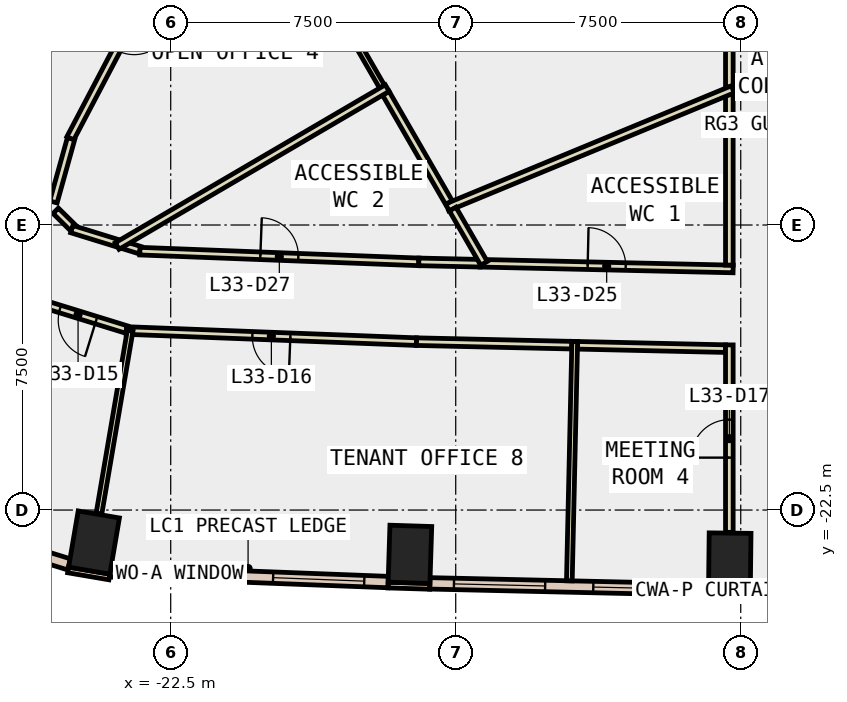
"""IFC4 building model, lengths in metres.
Left out: names, types, materials, properties, quantities, classifications, styles, units other than length and angle.
Written with IfcOpenShell. Run it as: python <this file> out.ifc"""

import sys

from ifc_helpers import new_model, si_unit, direction, frame, frame_2d, origin, origin_2d, place, context, subcontext, project, spatial, rectangle, extrude, element, fill, save


model = new_model("IFC4")
c1 = context("Model", 3, precision=1e-05, world=origin(), true_north=direction((0.0, 1.0)))
c2 = subcontext(c1, "Body", "Model", "MODEL_VIEW")
j1 = project(units=[si_unit("LENGTHUNIT", "METRE"), si_unit("PLANEANGLEUNIT", "RADIAN")], contexts=[c1])
p1 = place(None, origin())
s1 = spatial("IfcSite", under=j1, at=p1, CompositionType="ELEMENT")
p2 = place(p1, origin())
s2 = spatial("IfcBuilding", under=s1, at=p2, CompositionType="ELEMENT")
p3 = place(p2, frame((0.0, 0.0, 150.8)))
s3 = spatial("IfcBuildingStorey", under=s2, at=p3, CompositionType="ELEMENT", Elevation=150.8)
for number, where, z_axis, x_axis in (
    (1, (-24.518, -23.355, -0.4), (0.0, 0.0, 1.0), (-0.986, 0.168, 0.0)),
    (2, (-16.205, -23.666, -0.4), (0.0, 0.0, 1.0), (-0.999, 0.032, 0.0)),
    (3, (-7.789, -23.857, -0.4), (0.0, 0.0, 1.0), (-1.0, 0.012, 0.0)),
):
    element("IfcColumn", number, at=place(p3, frame(where, z_axis=z_axis, x_axis=x_axis)), inside=s3, PredefinedType="COLUMN", context=c2, shape_type="SweptSolid", body=[
        extrude(rectangle(XDim=1.1, YDim=1.5, at=origin_2d()), origin(), (0.0, 0.0, 1.0), 4.2),
    ])
p4 = place(p3, frame((-25.199, -24.076, 0.0), z_axis=(0.0, 0.0, 1.0), x_axis=(0.985763338892, -0.168138751323, 0.0)))
e4 = element("IfcWall", 4, at=p4, inside=s3, PredefinedType="STANDARD", context=c2, shape_type="SweptSolid", body=[
    extrude(rectangle(XDim=1.101, YDim=0.15, at=frame_2d((0.55, 0.0))), origin(), (0.0, 0.0, 1.0), 3.8),
])
p5 = place(p3, frame((-16.781, -24.474, 0.0), z_axis=(0.0, 0.0, 1.0), x_axis=(0.999523702549, -0.030860460829, 0.0)))
e5 = element("IfcWall", 5, at=p5, inside=s3, PredefinedType="STANDARD", context=c2, shape_type="SweptSolid", body=[
    extrude(rectangle(XDim=1.1, YDim=0.15, at=frame_2d((0.55, 0.0))), origin(), (0.0, 0.0, 1.0), 3.8),
])
p6 = place(p3, frame((-8.349, -24.676, 0.0), z_axis=(0.0, 0.0, 1.0), x_axis=(0.999940879068, -0.010873746799, 0.0)))
e6 = element("IfcWall", 6, at=p6, inside=s3, PredefinedType="STANDARD", context=c2, shape_type="SweptSolid", body=[
    extrude(rectangle(XDim=1.1, YDim=0.15, at=frame_2d((0.55, 0.0))), origin(), (0.0, 0.0, 1.0), 3.8),
])
p7 = place(p3, frame((-24.09, -24.114, 0.0), z_axis=(0.0, 0.0, 1.0), x_axis=(0.999262356942, -0.038402369711, 0.0)))
e7 = element("IfcWall", 7, at=p7, inside=s3, PredefinedType="STANDARD", context=c2, shape_type="SweptSolid", body=[
    extrude(rectangle(XDim=7.317, YDim=0.3, at=frame_2d((3.659, 0.0))), origin(), (0.0, 0.0, 1.0), 3.8),
])
p8 = place(p7, frame((0.629, 0.0, 0.9)))
e8 = element("IfcOpeningElement", 8, at=p8, cuts=e7, PredefinedType="OPENING", context=c2, shape_type="SweptSolid", body=[
    extrude(rectangle(XDim=2.4, YDim=2.6, at=frame_2d((1.2, 1.3))), frame((0.0, 0.16, 0.0), z_axis=(0.0, -1.0, 0.0), x_axis=(1.0, 0.0, 0.0)), (0.0, 0.0, 1.0), 0.32),
])
p9 = place(p7, frame((4.288, 0.0, 0.9)))
e9 = element("IfcOpeningElement", 9, at=p9, cuts=e7, PredefinedType="OPENING", context=c2, shape_type="SweptSolid", body=[
    extrude(rectangle(XDim=2.4, YDim=2.6, at=frame_2d((1.2, 1.3))), frame((0.0, 0.16, 0.0), z_axis=(0.0, -1.0, 0.0), x_axis=(1.0, 0.0, 0.0)), (0.0, 0.0, 1.0), 0.32),
])
p10 = place(p3, frame((-15.68, -24.429, 0.0), z_axis=(0.0, 0.0, 1.0), x_axis=(0.999743825009, -0.022633699594, 0.0)))
e10 = element("IfcWall", 10, at=p10, inside=s3, PredefinedType="STANDARD", context=c2, shape_type="SweptSolid", body=[
    extrude(rectangle(XDim=7.335, YDim=0.3, at=frame_2d((3.667, 0.0))), origin(), (0.0, 0.0, 1.0), 3.8),
])
p11 = place(p10, frame((0.634, 0.0, 0.9)))
e11 = element("IfcOpeningElement", 11, at=p11, cuts=e10, PredefinedType="OPENING", context=c2, shape_type="SweptSolid", body=[
    extrude(rectangle(XDim=2.4, YDim=2.6, at=frame_2d((1.2, 1.3))), frame((0.0, 0.16, 0.0), z_axis=(0.0, -1.0, 0.0), x_axis=(1.0, 0.0, 0.0)), (0.0, 0.0, 1.0), 0.32),
])
p12 = place(p10, frame((4.301, 0.0, 0.9)))
e12 = element("IfcOpeningElement", 12, at=p12, cuts=e10, PredefinedType="OPENING", context=c2, shape_type="SweptSolid", body=[
    extrude(rectangle(XDim=2.4, YDim=2.6, at=frame_2d((1.2, 1.3))), frame((0.0, 0.16, 0.0), z_axis=(0.0, -1.0, 0.0), x_axis=(1.0, 0.0, 0.0)), (0.0, 0.0, 1.0), 0.32),
])
p13 = place(p3, frame((-28.929, -22.77, 0.0), z_axis=(0.0, 0.0, 1.0), x_axis=(0.955473661147, -0.295076401723, 0.0)))
e13 = element("IfcWall", 13, at=p13, inside=s3, PredefinedType="STANDARD", context=c2, shape_type="SweptSolid", body=[
    extrude(rectangle(XDim=3.931, YDim=0.3, at=frame_2d((1.965, 0.0))), origin(), (0.0, 0.0, 1.0), 3.8),
])
p14 = place(p13, frame((1.266, 0.0, 0.9)))
e14 = element("IfcOpeningElement", 14, at=p14, cuts=e13, PredefinedType="OPENING", context=c2, shape_type="SweptSolid", body=[
    extrude(rectangle(XDim=1.4, YDim=2.6, at=frame_2d((0.7, 1.3))), frame((0.0, 0.16, 0.0), z_axis=(0.0, -1.0, 0.0), x_axis=(1.0, 0.0, 0.0)), (0.0, 0.0, 1.0), 0.32),
])
p15 = place(p3, frame((-14.356, -16.006, 0.0), z_axis=(0.0, 0.0, 1.0), x_axis=(0.999743177933, -0.022662263286, 0.0)))
e15 = element("IfcWall", 15, at=p15, inside=s3, PredefinedType="PARTITIONING", context=c2, shape_type="SweptSolid", body=[
    extrude(rectangle(XDim=6.658, YDim=0.2, at=frame_2d((3.329, 0.0))), origin(), (0.0, 0.0, 1.0), 3.8),
])
p16 = place(p15, frame((2.829, 0.0, 0.0)))
e16 = element("IfcOpeningElement", 16, at=p16, cuts=e15, PredefinedType="OPENING", context=c2, shape_type="SweptSolid", body=[
    extrude(rectangle(XDim=1.0, YDim=2.1, at=frame_2d((0.5, 1.05))), frame((0.0, 0.11, 0.0), z_axis=(0.0, -1.0, 0.0), x_axis=(1.0, 0.0, 0.0)), (0.0, 0.0, 1.0), 0.22),
])
p17 = place(p3, frame((-22.241, -7.198, 0.0), z_axis=(0.0, 0.0, 1.0), x_axis=(-0.465089990515, -0.885263407536, 0.0)))
e17 = element("IfcWall", 17, at=p17, inside=s3, PredefinedType="PARTITIONING", context=c2, shape_type="SweptSolid", body=[
    extrude(rectangle(XDim=6.24, YDim=0.2, at=frame_2d((3.12, 0.0))), origin(), (0.0, 0.0, 1.0), 3.8),
])
p18 = place(p17, frame((2.62, 0.0, 0.0)))
e18 = element("IfcOpeningElement", 18, at=p18, cuts=e17, PredefinedType="OPENING", context=c2, shape_type="SweptSolid", body=[
    extrude(rectangle(XDim=1.0, YDim=2.1, at=frame_2d((0.5, 1.05))), frame((0.0, 0.11, 0.0), z_axis=(0.0, -1.0, 0.0), x_axis=(1.0, 0.0, 0.0)), (0.0, 0.0, 1.0), 0.22),
])
p19 = place(p3, frame((-25.123, -12.73, 0.0), z_axis=(0.0, 0.0, 1.0), x_axis=(-0.268139825244, -0.963380005044, 0.0)))
e19 = element("IfcWall", 19, at=p19, inside=s3, PredefinedType="PARTITIONING", context=c2, shape_type="SweptSolid", body=[
    extrude(rectangle(XDim=1.726, YDim=0.2, at=frame_2d((0.863, 0.0))), origin(), (0.0, 0.0, 1.0), 3.8),
])
p20 = place(p3, frame((-25.526, -14.626, 0.0), z_axis=(0.0, 0.0, 1.0), x_axis=(0.711758647644, -0.702424108003, 0.0)))
e20 = element("IfcWall", 20, at=p20, inside=s3, PredefinedType="PARTITIONING", context=c2, shape_type="SweptSolid", body=[
    extrude(rectangle(XDim=0.628, YDim=0.2, at=frame_2d((0.314, 0.0))), origin(), (0.0, 0.0, 1.0), 3.8),
])
p21 = place(p3, frame((-25.103, -15.108, 0.0), z_axis=(0.0, 0.0, 1.0), x_axis=(0.955420813731, -0.295247470251, 0.0)))
e21 = element("IfcWall", 21, at=p21, inside=s3, PredefinedType="PARTITIONING", context=c2, shape_type="SweptSolid", body=[
    extrude(rectangle(XDim=1.24, YDim=0.2, at=frame_2d((0.62, 0.0))), origin(), (0.0, 0.0, 1.0), 3.8),
])
p22 = place(p3, frame((-23.727, -15.532, 0.0), z_axis=(0.0, 0.0, 1.0), x_axis=(0.955237350621, -0.295840504289, 0.0)))
e22 = element("IfcWall", 22, at=p22, inside=s3, PredefinedType="PARTITIONING", context=c2, shape_type="SweptSolid", body=[
    extrude(rectangle(XDim=0.44, YDim=0.2, at=frame_2d((0.22, 0.0))), origin(), (0.0, 0.0, 1.0), 3.8),
])
p23 = place(p3, frame((-23.311, -15.688, 0.0), z_axis=(0.0, 0.0, 1.0), x_axis=(0.999262695969, -0.038393546916, 0.0)))
e23 = element("IfcWall", 23, at=p23, inside=s3, PredefinedType="PARTITIONING", context=c2, shape_type="SweptSolid", body=[
    extrude(rectangle(XDim=7.344, YDim=0.2, at=frame_2d((3.672, 0.0))), origin(), (0.0, 0.0, 1.0), 3.8),
])
p24 = place(p23, frame((3.172, 0.0, 0.0)))
e24 = element("IfcOpeningElement", 24, at=p24, cuts=e23, PredefinedType="OPENING", context=c2, shape_type="SweptSolid", body=[
    extrude(rectangle(XDim=1.0, YDim=2.1, at=frame_2d((0.5, 1.05))), frame((0.0, 0.11, 0.0), z_axis=(0.0, -1.0, 0.0), x_axis=(1.0, 0.0, 0.0)), (0.0, 0.0, 1.0), 0.22),
])
p25 = place(p3, frame((-15.972, -15.97, 0.0), z_axis=(0.0, 0.0, 1.0), x_axis=(0.999750111735, -0.022354285623, 0.0)))
e25 = element("IfcWall", 25, at=p25, inside=s3, PredefinedType="PARTITIONING", context=c2, shape_type="SweptSolid", body=[
    extrude(rectangle(XDim=1.616, YDim=0.2, at=frame_2d((0.808, 0.0))), origin(), (0.0, 0.0, 1.0), 3.8),
])
p26 = place(p3, frame((-27.106, -11.944, 0.0), z_axis=(0.0, 0.0, 1.0), x_axis=(0.464985599417, 0.885318243534, 0.0)))
e26 = element("IfcWall", 26, at=p26, inside=s3, PredefinedType="PARTITIONING", context=c2, shape_type="SweptSolid", body=[
    extrude(rectangle(XDim=6.402, YDim=0.2, at=frame_2d((3.201, 0.0))), origin(), (0.0, 0.0, 1.0), 3.8),
])
p27 = place(p26, frame((2.776, 0.0, 0.0)))
e27 = element("IfcOpeningElement", 27, at=p27, cuts=e26, PredefinedType="OPENING", context=c2, shape_type="SweptSolid", body=[
    extrude(rectangle(XDim=1.0, YDim=2.1, at=frame_2d((0.5, 1.05))), frame((0.0, 0.11, 0.0), z_axis=(0.0, -1.0, 0.0), x_axis=(1.0, 0.0, 0.0)), (0.0, 0.0, 1.0), 0.22),
])
p28 = place(p3, frame((-23.663, -17.75, 0.0), z_axis=(0.0, 0.0, 1.0), x_axis=(-0.955509582123, 0.294960062501, 0.0)))
e28 = element("IfcWall", 28, at=p28, inside=s3, PredefinedType="PARTITIONING", context=c2, shape_type="SweptSolid", body=[
    extrude(rectangle(XDim=2.668, YDim=0.2, at=frame_2d((1.334, 0.0))), origin(), (0.0, 0.0, 1.0), 3.8),
])
p29 = place(p28, frame((0.834, 0.0, 0.0)))
e29 = element("IfcOpeningElement", 29, at=p29, cuts=e28, PredefinedType="OPENING", context=c2, shape_type="SweptSolid", body=[
    extrude(rectangle(XDim=1.0, YDim=2.1, at=frame_2d((0.5, 1.05))), frame((0.0, 0.11, 0.0), z_axis=(0.0, -1.0, 0.0), x_axis=(1.0, 0.0, 0.0)), (0.0, 0.0, 1.0), 0.22),
])
p30 = place(p3, frame((-11.945, -18.162, 0.0), z_axis=(0.0, 0.0, 1.0), x_axis=(-0.999741589065, 0.022732247877, 0.0)))
e30 = element("IfcWall", 30, at=p30, inside=s3, PredefinedType="PARTITIONING", context=c2, shape_type="SweptSolid", body=[
    extrude(rectangle(XDim=4.092, YDim=0.2, at=frame_2d((2.046, 0.0))), origin(), (0.0, 0.0, 1.0), 3.8),
])
p31 = place(p3, frame((-16.036, -18.069, 0.0), z_axis=(0.0, 0.0, 1.0), x_axis=(-0.999262637786, 0.038395061202, 0.0)))
e31 = element("IfcWall", 31, at=p31, inside=s3, PredefinedType="PARTITIONING", context=c2, shape_type="SweptSolid", body=[
    extrude(rectangle(XDim=7.637, YDim=0.2, at=frame_2d((3.818, 0.0))), origin(), (0.0, 0.0, 1.0), 3.8),
])
p32 = place(p31, frame((3.318, 0.0, 0.0)))
e32 = element("IfcOpeningElement", 32, at=p32, cuts=e31, PredefinedType="OPENING", context=c2, shape_type="SweptSolid", body=[
    extrude(rectangle(XDim=1.0, YDim=2.1, at=frame_2d((0.5, 1.05))), frame((0.0, 0.11, 0.0), z_axis=(0.0, -1.0, 0.0), x_axis=(1.0, 0.0, 0.0)), (0.0, 0.0, 1.0), 0.22),
])
p33 = place(p3, frame((-7.9, -18.253, 0.0), z_axis=(0.0, 0.0, 1.0), x_axis=(-0.999745510411, 0.022559131487, 0.0)))
e33 = element("IfcWall", 33, at=p33, inside=s3, PredefinedType="PARTITIONING", context=c2, shape_type="SweptSolid", body=[
    extrude(rectangle(XDim=3.896, YDim=0.2, at=frame_2d((1.948, 0.0))), origin(), (0.0, 0.0, 1.0), 3.8),
])
p34 = place(p3, frame((-7.8, -11.368, 0.0), z_axis=(0.0, 0.0, 1.0), x_axis=(0.0, 1.0, 0.0)))
e34 = element("IfcWall", 34, at=p34, inside=s3, PredefinedType="PARTITIONING", context=c2, shape_type="SweptSolid", body=[
    extrude(rectangle(XDim=1.969, YDim=0.2, at=frame_2d((0.984, 0.0))), origin(), (0.0, 0.0, 1.0), 3.8),
])
p35 = place(p3, frame((-7.8, -16.055, 0.0), z_axis=(0.0, 0.0, 1.0), x_axis=(0.0, 1.0, 0.0)))
e35 = element("IfcWall", 35, at=p35, inside=s3, PredefinedType="PARTITIONING", context=c2, shape_type="SweptSolid", body=[
    extrude(rectangle(XDim=4.487, YDim=0.2, at=frame_2d((2.243, 0.0))), origin(), (0.0, 0.0, 1.0), 3.8),
])
p36 = place(p3, frame((-7.8, -23.087, 0.0), z_axis=(0.0, 0.0, 1.0), x_axis=(0.0, 1.0, 0.0)))
e36 = element("IfcWall", 36, at=p36, inside=s3, PredefinedType="PARTITIONING", context=c2, shape_type="SweptSolid", body=[
    extrude(rectangle(XDim=4.932, YDim=0.2, at=frame_2d((2.466, 0.0))), origin(), (0.0, 0.0, 1.0), 3.8),
])
p37 = place(p36, frame((1.966, 0.0, 0.0)))
e37 = element("IfcOpeningElement", 37, at=p37, cuts=e36, PredefinedType="OPENING", context=c2, shape_type="SweptSolid", body=[
    extrude(rectangle(XDim=1.0, YDim=2.1, at=frame_2d((0.5, 1.05))), frame((0.0, 0.11, 0.0), z_axis=(0.0, -1.0, 0.0), x_axis=(1.0, 0.0, 0.0)), (0.0, 0.0, 1.0), 0.22),
])
p38 = place(p3, frame((-7.708, -11.43, 0.0), z_axis=(0.0, 0.0, 1.0), x_axis=(-0.924285151797, -0.381702709144, 0.0)))
e38 = element("IfcWall", 38, at=p38, inside=s3, PredefinedType="PARTITIONING", context=c2, shape_type="SweptSolid", body=[
    extrude(rectangle(XDim=8.129, YDim=0.2, at=frame_2d((4.065, 0.0))), origin(), (0.0, 0.0, 1.0), 3.8),
])
p39 = place(p3, frame((-16.939, -11.36, 0.0), z_axis=(0.0, 0.0, 1.0), x_axis=(-0.500053473428, 0.865994528685, 0.0)))
e39 = element("IfcWall", 39, at=p39, inside=s3, PredefinedType="PARTITIONING", context=c2, shape_type="SweptSolid", body=[
    extrude(rectangle(XDim=7.895, YDim=0.15, at=frame_2d((3.948, 0.0))), origin(), (0.0, 0.0, 1.0), 3.8),
])
p40 = place(p3, frame((-15.18, -14.408, 0.0), z_axis=(0.0, 0.0, 1.0), x_axis=(-0.499968694491, 0.866043477274, 0.0)))
e40 = element("IfcWall", 40, at=p40, inside=s3, PredefinedType="PARTITIONING", context=c2, shape_type="SweptSolid", body=[
    extrude(rectangle(XDim=3.319, YDim=0.2, at=frame_2d((1.659, 0.0))), origin(), (0.0, 0.0, 1.0), 3.8),
])
p41 = place(p3, frame((-14.256, -16.009, 0.0), z_axis=(0.0, 0.0, 1.0), x_axis=(-0.499786551025, 0.86614860354, 0.0)))
e41 = element("IfcWall", 41, at=p41, inside=s3, PredefinedType="PARTITIONING", context=c2, shape_type="SweptSolid", body=[
    extrude(rectangle(XDim=1.649, YDim=0.2, at=frame_2d((0.824, 0.0))), origin(), (0.0, 0.0, 1.0), 3.8),
])
p42 = place(p3, frame((-16.803, -11.397, 0.0), z_axis=(0.0, 0.0, 1.0), x_axis=(-0.863203941699, -0.504855380318, 0.0)))
e42 = element("IfcWall", 42, at=p42, inside=s3, PredefinedType="PARTITIONING", context=c2, shape_type="SweptSolid", body=[
    extrude(rectangle(XDim=8.232, YDim=0.2, at=frame_2d((4.116, 0.0))), origin(), (0.0, 0.0, 1.0), 3.8),
])
p43 = place(p3, frame((-23.567, -17.779, 0.0), z_axis=(0.0, 0.0, 1.0), x_axis=(-0.168027663896, -0.985782280306, 0.0)))
e43 = element("IfcWall", 43, at=p43, inside=s3, PredefinedType="PARTITIONING", context=c2, shape_type="SweptSolid", body=[
    extrude(rectangle(XDim=4.886, YDim=0.15, at=frame_2d((2.443, 0.0))), origin(), (0.0, 0.0, 1.0), 3.8),
])
p44 = place(p3, frame((-11.868, -18.063, 0.0), z_axis=(0.0, 0.0, 1.0), x_axis=(-0.022551528502, -0.999745681942, 0.0)))
e44 = element("IfcWall", 44, at=p44, inside=s3, PredefinedType="PARTITIONING", context=c2, shape_type="SweptSolid", body=[
    extrude(rectangle(XDim=6.301, YDim=0.15, at=frame_2d((3.15, 0.0))), origin(), (0.0, 0.0, 1.0), 3.8),
])
p45 = place(p8, origin())
e45 = element("IfcWindow", 45, at=p45, inside=s3, PartitioningType="SINGLE_PANEL", PredefinedType="WINDOW", context=c2, shape_type="SweptSolid", body=[
    extrude(rectangle(XDim=2.4, YDim=2.6, at=frame_2d((1.2, 1.3))), frame((0.0, 0.03, 0.0), z_axis=(0.0, -1.0, 0.0), x_axis=(1.0, 0.0, 0.0)), (0.0, 0.0, 1.0), 0.06),
])
fill(e8, e45)
p46 = place(p9, origin())
e46 = element("IfcWindow", 46, at=p46, inside=s3, PartitioningType="SINGLE_PANEL", PredefinedType="WINDOW", context=c2, shape_type="SweptSolid", body=[
    extrude(rectangle(XDim=2.4, YDim=2.6, at=frame_2d((1.2, 1.3))), frame((0.0, 0.03, 0.0), z_axis=(0.0, -1.0, 0.0), x_axis=(1.0, 0.0, 0.0)), (0.0, 0.0, 1.0), 0.06),
])
fill(e9, e46)
p47 = place(p11, origin())
e47 = element("IfcWindow", 47, at=p47, inside=s3, PartitioningType="SINGLE_PANEL", PredefinedType="WINDOW", context=c2, shape_type="SweptSolid", body=[
    extrude(rectangle(XDim=2.4, YDim=2.6, at=frame_2d((1.2, 1.3))), frame((0.0, 0.03, 0.0), z_axis=(0.0, -1.0, 0.0), x_axis=(1.0, 0.0, 0.0)), (0.0, 0.0, 1.0), 0.06),
])
fill(e11, e47)
p48 = place(p12, origin())
e48 = element("IfcWindow", 48, at=p48, inside=s3, PartitioningType="SINGLE_PANEL", PredefinedType="WINDOW", context=c2, shape_type="SweptSolid", body=[
    extrude(rectangle(XDim=2.4, YDim=2.6, at=frame_2d((1.2, 1.3))), frame((0.0, 0.03, 0.0), z_axis=(0.0, -1.0, 0.0), x_axis=(1.0, 0.0, 0.0)), (0.0, 0.0, 1.0), 0.06),
])
fill(e12, e48)
p49 = place(p29, origin())
e49 = element("IfcDoor", 49, at=p49, inside=s3, OperationType="SINGLE_SWING_LEFT", PredefinedType="DOOR", context=c2, shape_type="SweptSolid", body=[
    extrude(rectangle(XDim=1.0, YDim=2.1, at=frame_2d((0.5, 1.05))), frame((0.0, 0.025, 0.0), z_axis=(0.0, -1.0, 0.0), x_axis=(1.0, 0.0, 0.0)), (0.0, 0.0, 1.0), 0.05),
])
fill(e29, e49)
p50 = place(p32, origin())
e50 = element("IfcDoor", 50, at=p50, inside=s3, OperationType="SINGLE_SWING_RIGHT", PredefinedType="DOOR", context=c2, shape_type="SweptSolid", body=[
    extrude(rectangle(XDim=1.0, YDim=2.1, at=frame_2d((0.5, 1.05))), frame((0.0, 0.025, 0.0), z_axis=(0.0, -1.0, 0.0), x_axis=(1.0, 0.0, 0.0)), (0.0, 0.0, 1.0), 0.05),
])
fill(e32, e50)
p51 = place(p37, origin())
e51 = element("IfcDoor", 51, at=p51, inside=s3, OperationType="SINGLE_SWING_LEFT", PredefinedType="DOOR", context=c2, shape_type="SweptSolid", body=[
    extrude(rectangle(XDim=1.0, YDim=2.1, at=frame_2d((0.5, 1.05))), frame((0.0, 0.025, 0.0), z_axis=(0.0, -1.0, 0.0), x_axis=(1.0, 0.0, 0.0)), (0.0, 0.0, 1.0), 0.05),
])
fill(e37, e51)
p52 = place(p16, origin())
e52 = element("IfcDoor", 52, at=p52, inside=s3, OperationType="SINGLE_SWING_LEFT", PredefinedType="DOOR", context=c2, shape_type="SweptSolid", body=[
    extrude(rectangle(XDim=1.0, YDim=2.1, at=frame_2d((0.5, 1.05))), frame((0.0, 0.025, 0.0), z_axis=(0.0, -1.0, 0.0), x_axis=(1.0, 0.0, 0.0)), (0.0, 0.0, 1.0), 0.05),
])
fill(e16, e52)
p53 = place(p24, origin())
e53 = element("IfcDoor", 53, at=p53, inside=s3, OperationType="SINGLE_SWING_RIGHT", PredefinedType="DOOR", context=c2, shape_type="SweptSolid", body=[
    extrude(rectangle(XDim=1.0, YDim=2.1, at=frame_2d((0.5, 1.05))), frame((0.0, 0.025, 0.0), z_axis=(0.0, -1.0, 0.0), x_axis=(1.0, 0.0, 0.0)), (0.0, 0.0, 1.0), 0.05),
])
fill(e24, e53)
save(model, sys.argv[1])
